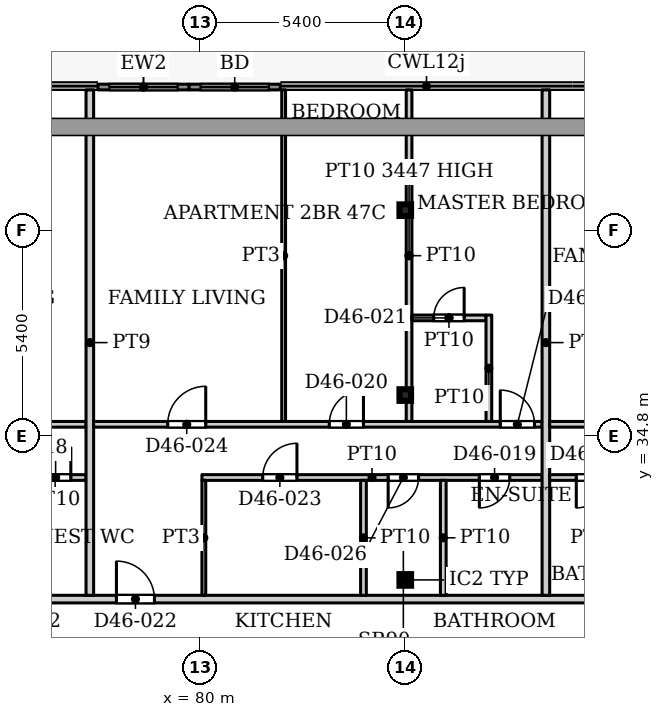
"""IFC4 building model, lengths in metres.
Left out: names, types, materials, properties, quantities, classifications, styles, units other than length and angle.
Written with IfcOpenShell. Run it as: python <this file> out.ifc"""

import sys

from ifc_helpers import new_model, si_unit, direction, frame, frame_2d, origin, origin_2d, place, context, subcontext, project, spatial, rectangle, hollow_rectangle, extrude, source, transform, mapped, element, fill, save


model = new_model("IFC4")
c1 = context("Model", 3, precision=1e-05, world=origin(), true_north=direction((0.0, 1.0)))
c2 = subcontext(c1, "Body", "Model", "MODEL_VIEW")
j1 = project(units=[si_unit("LENGTHUNIT", "METRE"), si_unit("PLANEANGLEUNIT", "RADIAN")], contexts=[c1])
p1 = place(None, origin())
s1 = spatial("IfcSite", under=j1, at=p1, CompositionType="ELEMENT")
p2 = place(p1, origin())
s2 = spatial("IfcBuilding", under=s1, at=p2, CompositionType="ELEMENT")
p3 = place(p2, frame((0.0, 0.0, 199.4)))
s3 = spatial("IfcBuildingStorey", under=s2, at=p3, CompositionType="ELEMENT", Elevation=199.4)
for number, where, z_axis, x_axis in (
    (1, (85.4, 31.005, 0.0), (0.0, 0.0, 1.0), (1.0, 0.0, 0.0)),
    (2, (85.4, 35.87, 0.0), (0.0, 0.0, 1.0), (1.0, 0.0, 0.0)),
    (3, (85.4, 40.735, 0.0), (0.0, 0.0, 1.0), (1.0, 0.0, 0.0)),
):
    element("IfcColumn", number, at=place(p3, frame(where, z_axis=z_axis, x_axis=x_axis)), inside=s3, PredefinedType="COLUMN", context=c2, shape_type="SweptSolid", body=[
        extrude(hollow_rectangle(XDim=0.305, YDim=0.305, WallThickness=0.016, InnerFilletRadius=0.016, OuterFilletRadius=0.032, at=origin_2d()), origin(), (0.0, 0.0, 1.0), 3.9),
    ])
p4 = place(p3, frame((77.312, 43.975, 0.0), z_axis=(0.0, 0.0, 1.0), x_axis=(1.0, 0.0, 0.0)))
e4 = element("IfcWall", 4, at=p4, inside=s3, PredefinedType="SOLIDWALL", context=c2, shape_type="SweptSolid", body=[
    extrude(rectangle(XDim=2.4, YDim=0.15, at=frame_2d((1.2, 0.0))), origin(), (0.0, 0.0, 1.0), 3.75),
])
p5 = place(p4, frame((0.3, 0.0, 0.0)))
e5 = element("IfcOpeningElement", 5, at=p5, cuts=e4, PredefinedType="OPENING", context=c2, shape_type="SweptSolid", body=[
    extrude(rectangle(XDim=1.8, YDim=2.4, at=frame_2d((0.9, 1.2))), frame((0.0, 0.085, 0.0), z_axis=(0.0, -1.0, 0.0), x_axis=(1.0, 0.0, 0.0)), (0.0, 0.0, 1.0), 0.17),
])
p6 = place(p3, frame((79.712, 43.975, 0.0), z_axis=(0.0, 0.0, 1.0), x_axis=(1.0, 0.0, 0.0)))
e6 = element("IfcWall", 6, at=p6, inside=s3, PredefinedType="SOLIDWALL", context=c2, shape_type="SweptSolid", body=[
    extrude(rectangle(XDim=2.4, YDim=0.15, at=frame_2d((1.2, 0.0))), origin(), (0.0, 0.0, 1.0), 3.75),
])
p7 = place(p6, frame((0.3, 0.0, 0.0)))
e7 = element("IfcOpeningElement", 7, at=p7, cuts=e6, PredefinedType="OPENING", context=c2, shape_type="SweptSolid", body=[
    extrude(rectangle(XDim=1.8, YDim=2.4, at=frame_2d((0.9, 1.2))), frame((0.0, 0.085, 0.0), z_axis=(0.0, -1.0, 0.0), x_axis=(1.0, 0.0, 0.0)), (0.0, 0.0, 1.0), 0.17),
])
p8 = place(p3, frame((53.549, 30.5, 0.0), z_axis=(0.0, 0.0, 1.0), x_axis=(1.0, 0.0, 0.0)))
e8 = element("IfcWall", 8, at=p8, inside=s3, PredefinedType="PARTITIONING", context=c2, shape_type="SweptSolid", body=[
    extrude(rectangle(XDim=44.551, YDim=0.2, at=frame_2d((22.275, 0.0))), origin(), (0.0, 0.0, 1.0), 3.6),
])
p9 = place(p8, frame((5.501, 0.0, 0.0)))
e9 = element("IfcOpeningElement", 9, at=p9, cuts=e8, PredefinedType="OPENING", context=c2, shape_type="SweptSolid", body=[
    extrude(rectangle(XDim=1.0, YDim=2.1, at=frame_2d((0.5, 1.05))), frame((0.0, 0.11, 0.0), z_axis=(0.0, -1.0, 0.0), x_axis=(1.0, 0.0, 0.0)), (0.0, 0.0, 1.0), 0.22),
])
p10 = place(p8, frame((20.201, 0.0, 0.0)))
e10 = element("IfcOpeningElement", 10, at=p10, cuts=e8, PredefinedType="OPENING", context=c2, shape_type="SweptSolid", body=[
    extrude(rectangle(XDim=1.0, YDim=2.1, at=frame_2d((0.5, 1.05))), frame((0.0, 0.11, 0.0), z_axis=(0.0, -1.0, 0.0), x_axis=(1.0, 0.0, 0.0)), (0.0, 0.0, 1.0), 0.22),
])
p11 = place(p8, frame((24.251, 0.0, 0.0)))
e11 = element("IfcOpeningElement", 11, at=p11, cuts=e8, PredefinedType="OPENING", context=c2, shape_type="SweptSolid", body=[
    extrude(rectangle(XDim=1.0, YDim=2.1, at=frame_2d((0.5, 1.05))), frame((0.0, 0.11, 0.0), z_axis=(0.0, -1.0, 0.0), x_axis=(1.0, 0.0, 0.0)), (0.0, 0.0, 1.0), 0.22),
])
p12 = place(p8, frame((40.151, 0.0, 0.0)))
e12 = element("IfcOpeningElement", 12, at=p12, cuts=e8, PredefinedType="OPENING", context=c2, shape_type="SweptSolid", body=[
    extrude(rectangle(XDim=1.0, YDim=2.1, at=frame_2d((0.5, 1.05))), frame((0.0, 0.11, 0.0), z_axis=(0.0, -1.0, 0.0), x_axis=(1.0, 0.0, 0.0)), (0.0, 0.0, 1.0), 0.22),
])
p13 = place(p3, frame((67.3, 35.1, 0.0), z_axis=(0.0, 0.0, 1.0), x_axis=(1.0, 0.0, 0.0)))
e13 = element("IfcWall", 13, at=p13, inside=s3, PredefinedType="PARTITIONING", context=c2, shape_type="SweptSolid", body=[
    extrude(rectangle(XDim=9.7, YDim=0.15, at=frame_2d((4.85, 0.0))), origin(), (0.0, 0.0, 1.0), 3.6),
])
p14 = place(p13, frame((1.0, 0.0, 0.0)))
e14 = element("IfcOpeningElement", 14, at=p14, cuts=e13, PredefinedType="OPENING", context=c2, shape_type="SweptSolid", body=[
    extrude(rectangle(XDim=0.9, YDim=2.1, at=frame_2d((0.45, 1.05))), frame((0.0, 0.085, 0.0), z_axis=(0.0, -1.0, 0.0), x_axis=(1.0, 0.0, 0.0)), (0.0, 0.0, 1.0), 0.17),
])
p15 = place(p13, frame((6.3, 0.0, 0.0)))
e15 = element("IfcOpeningElement", 15, at=p15, cuts=e13, PredefinedType="OPENING", context=c2, shape_type="SweptSolid", body=[
    extrude(rectangle(XDim=1.0, YDim=2.1, at=frame_2d((0.5, 1.05))), frame((0.0, 0.085, 0.0), z_axis=(0.0, -1.0, 0.0), x_axis=(1.0, 0.0, 0.0)), (0.0, 0.0, 1.0), 0.17),
])
p16 = place(p3, frame((75.375, 33.7, 0.0), z_axis=(0.0, 0.0, 1.0), x_axis=(1.0, 0.0, 0.0)))
e16 = element("IfcWall", 16, at=p16, inside=s3, PredefinedType="PARTITIONING", context=c2, shape_type="SweptSolid", body=[
    extrude(rectangle(XDim=1.625, YDim=0.15, at=frame_2d((0.812, 0.0))), origin(), (0.0, 0.0, 1.0), 3.6),
])
p17 = place(p16, frame((0.425, 0.0, 0.0)))
e17 = element("IfcOpeningElement", 17, at=p17, cuts=e16, PredefinedType="OPENING", context=c2, shape_type="SweptSolid", body=[
    extrude(rectangle(XDim=0.8, YDim=2.1, at=frame_2d((0.4, 1.05))), frame((0.0, 0.085, 0.0), z_axis=(0.0, -1.0, 0.0), x_axis=(1.0, 0.0, 0.0)), (0.0, 0.0, 1.0), 0.17),
])
p18 = place(p3, frame((77.1, 30.6, 0.0), z_axis=(0.0, 0.0, 1.0), x_axis=(0.0, 1.0, 0.0)))
e18 = element("IfcWall", 18, at=p18, inside=s3, PredefinedType="PARTITIONING", context=c2, shape_type="SweptSolid", body=[
    extrude(rectangle(XDim=13.3, YDim=0.2, at=frame_2d((6.65, 0.0))), origin(), (0.0, 0.0, 1.0), 3.6),
])
p19 = place(p3, frame((77.2, 35.1, 0.0), z_axis=(0.0, 0.0, 1.0), x_axis=(1.0, 0.0, 0.0)))
e19 = element("IfcWall", 19, at=p19, inside=s3, PredefinedType="PARTITIONING", context=c2, shape_type="SweptSolid", body=[
    extrude(rectangle(XDim=11.8, YDim=0.15, at=frame_2d((5.9, 0.0))), origin(), (0.0, 0.0, 1.0), 3.6),
])
p20 = place(p19, frame((6.2, 0.0, 0.0)))
e20 = element("IfcOpeningElement", 20, at=p20, cuts=e19, PredefinedType="OPENING", context=c2, shape_type="SweptSolid", body=[
    extrude(rectangle(XDim=0.9, YDim=2.1, at=frame_2d((0.45, 1.05))), frame((0.0, 0.085, 0.0), z_axis=(0.0, -1.0, 0.0), x_axis=(1.0, 0.0, 0.0)), (0.0, 0.0, 1.0), 0.17),
])
p21 = place(p19, frame((1.95, 0.0, 0.0)))
e21 = element("IfcOpeningElement", 21, at=p21, cuts=e19, PredefinedType="OPENING", context=c2, shape_type="SweptSolid", body=[
    extrude(rectangle(XDim=1.0, YDim=2.1, at=frame_2d((0.5, 1.05))), frame((0.0, 0.085, 0.0), z_axis=(0.0, -1.0, 0.0), x_axis=(1.0, 0.0, 0.0)), (0.0, 0.0, 1.0), 0.17),
])
p22 = place(p19, frame((10.7, 0.0, 0.0)))
e22 = element("IfcOpeningElement", 22, at=p22, cuts=e19, PredefinedType="OPENING", context=c2, shape_type="SweptSolid", body=[
    extrude(rectangle(XDim=0.9, YDim=2.1, at=frame_2d((0.45, 1.05))), frame((0.0, 0.085, 0.0), z_axis=(0.0, -1.0, 0.0), x_axis=(1.0, 0.0, 0.0)), (0.0, 0.0, 1.0), 0.17),
])
p23 = place(p3, frame((80.05, 33.7, 0.0), z_axis=(0.0, 0.0, 1.0), x_axis=(1.0, 0.0, 0.0)))
e23 = element("IfcWall", 23, at=p23, inside=s3, PredefinedType="PARTITIONING", context=c2, shape_type="SweptSolid", body=[
    extrude(rectangle(XDim=8.95, YDim=0.15, at=frame_2d((4.475, 0.0))), origin(), (0.0, 0.0, 1.0), 3.6),
])
p24 = place(p23, frame((7.3, 0.0, 0.0)))
e24 = element("IfcOpeningElement", 24, at=p24, cuts=e23, PredefinedType="OPENING", context=c2, shape_type="SweptSolid", body=[
    extrude(rectangle(XDim=0.8, YDim=2.1, at=frame_2d((0.4, 1.05))), frame((0.0, 0.085, 0.0), z_axis=(0.0, -1.0, 0.0), x_axis=(1.0, 0.0, 0.0)), (0.0, 0.0, 1.0), 0.17),
])
p25 = place(p23, frame((1.6, 0.0, 0.0)))
e25 = element("IfcOpeningElement", 25, at=p25, cuts=e23, PredefinedType="OPENING", context=c2, shape_type="SweptSolid", body=[
    extrude(rectangle(XDim=0.9, YDim=2.1, at=frame_2d((0.45, 1.05))), frame((0.0, 0.085, 0.0), z_axis=(0.0, -1.0, 0.0), x_axis=(1.0, 0.0, 0.0)), (0.0, 0.0, 1.0), 0.17),
])
p26 = place(p23, frame((4.9, 0.0, 0.0)))
e26 = element("IfcOpeningElement", 26, at=p26, cuts=e23, PredefinedType="OPENING", context=c2, shape_type="SweptSolid", body=[
    extrude(rectangle(XDim=0.8, YDim=2.1, at=frame_2d((0.4, 1.05))), frame((0.0, 0.085, 0.0), z_axis=(0.0, -1.0, 0.0), x_axis=(1.0, 0.0, 0.0)), (0.0, 0.0, 1.0), 0.17),
])
p27 = place(p3, frame((80.1, 30.6, 0.0), z_axis=(0.0, 0.0, 1.0), x_axis=(0.0, 1.0, 0.0)))
e27 = element("IfcWall", 27, at=p27, inside=s3, PredefinedType="PARTITIONING", context=c2, shape_type="SweptSolid", body=[
    extrude(rectangle(XDim=3.025, YDim=0.1, at=frame_2d((1.512, 0.0))), origin(), (0.0, 0.0, 1.0), 3.6),
])
p28 = place(p3, frame((82.2, 35.175, 0.0), z_axis=(0.0, 0.0, 1.0), x_axis=(0.0, 1.0, 0.0)))
e28 = element("IfcWall", 28, at=p28, inside=s3, PredefinedType="PARTITIONING", context=c2, shape_type="SweptSolid", body=[
    extrude(rectangle(XDim=8.725, YDim=0.1, at=frame_2d((4.362, 0.0))), origin(), (0.0, 0.0, 1.0), 3.6),
])
p29 = place(p3, frame((84.3, 30.6, 0.0), z_axis=(0.0, 0.0, 1.0), x_axis=(0.0, 1.0, 0.0)))
e29 = element("IfcWall", 29, at=p29, inside=s3, PredefinedType="PARTITIONING", context=c2, shape_type="SweptSolid", body=[
    extrude(rectangle(XDim=3.025, YDim=0.15, at=frame_2d((1.512, 0.0))), origin(), (0.0, 0.0, 1.0), 3.6),
])
p30 = place(p3, frame((85.5, 35.175, 0.0), z_axis=(0.0, 0.0, 1.0), x_axis=(0.0, 1.0, 0.0)))
e30 = element("IfcWall", 30, at=p30, inside=s3, PredefinedType="PARTITIONING", context=c2, shape_type="SweptSolid", body=[
    extrude(rectangle(XDim=8.725, YDim=0.15, at=frame_2d((4.362, 0.0))), origin(), (0.0, 0.0, 1.0), 3.447),
])
p31 = place(p3, frame((85.575, 37.9, 0.0), z_axis=(0.0, 0.0, 1.0), x_axis=(1.0, 0.0, 0.0)))
e31 = element("IfcWall", 31, at=p31, inside=s3, PredefinedType="PARTITIONING", context=c2, shape_type="SweptSolid", body=[
    extrude(rectangle(XDim=1.95, YDim=0.15, at=frame_2d((0.975, 0.0))), origin(), (0.0, 0.0, 1.0), 3.6),
])
p32 = place(p31, frame((0.575, 0.0, 0.0)))
e32 = element("IfcOpeningElement", 32, at=p32, cuts=e31, PredefinedType="OPENING", context=c2, shape_type="SweptSolid", body=[
    extrude(rectangle(XDim=0.8, YDim=2.1, at=frame_2d((0.4, 1.05))), frame((0.0, 0.085, 0.0), z_axis=(0.0, -1.0, 0.0), x_axis=(1.0, 0.0, 0.0)), (0.0, 0.0, 1.0), 0.17),
])
p33 = place(p3, frame((86.4, 30.6, 0.0), z_axis=(0.0, 0.0, 1.0), x_axis=(0.0, 1.0, 0.0)))
e33 = element("IfcWall", 33, at=p33, inside=s3, PredefinedType="PARTITIONING", context=c2, shape_type="SweptSolid", body=[
    extrude(rectangle(XDim=3.025, YDim=0.15, at=frame_2d((1.512, 0.0))), origin(), (0.0, 0.0, 1.0), 3.6),
])
p34 = place(p3, frame((87.6, 35.175, 0.0), z_axis=(0.0, 0.0, 1.0), x_axis=(0.0, 1.0, 0.0)))
e34 = element("IfcWall", 34, at=p34, inside=s3, PredefinedType="PARTITIONING", context=c2, shape_type="SweptSolid", body=[
    extrude(rectangle(XDim=2.8, YDim=0.15, at=frame_2d((1.4, 0.0))), origin(), (0.0, 0.0, 1.0), 3.6),
])
p35 = place(p3, frame((89.1, 30.6, 0.0), z_axis=(0.0, 0.0, 1.0), x_axis=(0.0, 1.0, 0.0)))
e35 = element("IfcWall", 35, at=p35, inside=s3, PredefinedType="PARTITIONING", context=c2, shape_type="SweptSolid", body=[
    extrude(rectangle(XDim=13.3, YDim=0.2, at=frame_2d((6.65, 0.0))), origin(), (0.0, 0.0, 1.0), 3.6),
])
p36 = place(p3, frame((89.2, 33.7, 0.0), z_axis=(0.0, 0.0, 1.0), x_axis=(1.0, 0.0, 0.0)))
e36 = element("IfcWall", 36, at=p36, inside=s3, PredefinedType="PARTITIONING", context=c2, shape_type="SweptSolid", body=[
    extrude(rectangle(XDim=4.15, YDim=0.15, at=frame_2d((2.075, 0.0))), origin(), (0.0, 0.0, 1.0), 3.6),
])
p37 = place(p36, frame((0.7, 0.0, 0.0)))
e37 = element("IfcOpeningElement", 37, at=p37, cuts=e36, PredefinedType="OPENING", context=c2, shape_type="SweptSolid", body=[
    extrude(rectangle(XDim=0.8, YDim=2.1, at=frame_2d((0.4, 1.05))), frame((0.0, 0.085, 0.0), z_axis=(0.0, -1.0, 0.0), x_axis=(1.0, 0.0, 0.0)), (0.0, 0.0, 1.0), 0.17),
])
p38 = place(p36, frame((2.8, 0.0, 0.0)))
e38 = element("IfcOpeningElement", 38, at=p38, cuts=e36, PredefinedType="OPENING", context=c2, shape_type="SweptSolid", body=[
    extrude(rectangle(XDim=0.8, YDim=2.1, at=frame_2d((0.4, 1.05))), frame((0.0, 0.085, 0.0), z_axis=(0.0, -1.0, 0.0), x_axis=(1.0, 0.0, 0.0)), (0.0, 0.0, 1.0), 0.17),
])
p39 = place(p3, frame((89.2, 35.1, 0.0), z_axis=(0.0, 0.0, 1.0), x_axis=(1.0, 0.0, 0.0)))
e39 = element("IfcWall", 39, at=p39, inside=s3, PredefinedType="PARTITIONING", context=c2, shape_type="SweptSolid", body=[
    extrude(rectangle(XDim=10.7, YDim=0.15, at=frame_2d((5.35, 0.0))), origin(), (0.0, 0.0, 1.0), 3.6),
])
p40 = place(p39, frame((9.05, 0.0, 0.0)))
e40 = element("IfcOpeningElement", 40, at=p40, cuts=e39, PredefinedType="OPENING", context=c2, shape_type="SweptSolid", body=[
    extrude(rectangle(XDim=0.9, YDim=2.1, at=frame_2d((0.45, 1.05))), frame((0.0, 0.085, 0.0), z_axis=(0.0, -1.0, 0.0), x_axis=(1.0, 0.0, 0.0)), (0.0, 0.0, 1.0), 0.17),
])
p41 = place(p39, frame((1.65, 0.0, 0.0)))
e41 = element("IfcOpeningElement", 41, at=p41, cuts=e39, PredefinedType="OPENING", context=c2, shape_type="SweptSolid", body=[
    extrude(rectangle(XDim=1.0, YDim=2.1, at=frame_2d((0.5, 1.05))), frame((0.0, 0.085, 0.0), z_axis=(0.0, -1.0, 0.0), x_axis=(1.0, 0.0, 0.0)), (0.0, 0.0, 1.0), 0.17),
])
p42 = place(p39, frame((6.95, 0.0, 0.0)))
e42 = element("IfcOpeningElement", 42, at=p42, cuts=e39, PredefinedType="OPENING", context=c2, shape_type="SweptSolid", body=[
    extrude(rectangle(XDim=0.9, YDim=2.1, at=frame_2d((0.45, 1.05))), frame((0.0, 0.085, 0.0), z_axis=(0.0, -1.0, 0.0), x_axis=(1.0, 0.0, 0.0)), (0.0, 0.0, 1.0), 0.17),
])
m1 = source(origin(), c2, "Body", "SweptSolid", [
    extrude(rectangle(XDim=1.8, YDim=2.4, at=frame_2d((0.9, 1.2))), frame((0.0, 0.025, 0.0), z_axis=(0.0, -1.0, 0.0), x_axis=(1.0, 0.0, 0.0)), (0.0, 0.0, 1.0), 0.05),
])
p43 = place(p5, origin())
e43 = element("IfcDoor", 43, at=p43, inside=s3, OperationType="SLIDING_TO_LEFT", PredefinedType="DOOR", context=c2, shape_type="MappedRepresentation", body=[
    mapped(m1, transform((0.0, 0.0, 0.0), x_axis=(1.0, 0.0, 0.0), y_axis=(0.0, 1.0, 0.0), z_axis=(0.0, 0.0, 1.0), scale=1.0)),
])
fill(e5, e43)
p44 = place(p7, origin())
e44 = element("IfcDoor", 44, at=p44, inside=s3, OperationType="SLIDING_TO_LEFT", PredefinedType="DOOR", context=c2, shape_type="MappedRepresentation", body=[
    mapped(m1, transform((0.0, 0.0, 0.0), x_axis=(1.0, 0.0, 0.0), y_axis=(0.0, 1.0, 0.0), z_axis=(0.0, 0.0, 1.0), scale=1.0)),
])
fill(e7, e44)
m2 = source(origin(), c2, "Body", "SweptSolid", [
    extrude(rectangle(XDim=0.8, YDim=2.1, at=frame_2d((0.4, 1.05))), frame((0.0, 0.025, 0.0), z_axis=(0.0, -1.0, 0.0), x_axis=(1.0, 0.0, 0.0)), (0.0, 0.0, 1.0), 0.05),
])
p45 = place(p17, origin())
e45 = element("IfcDoor", 45, at=p45, inside=s3, OperationType="SINGLE_SWING_LEFT", PredefinedType="DOOR", context=c2, shape_type="MappedRepresentation", body=[
    mapped(m2, transform((0.0, 0.0, 0.0), x_axis=(1.0, 0.0, 0.0), y_axis=(0.0, 1.0, 0.0), z_axis=(0.0, 0.0, 1.0), scale=1.0)),
])
fill(e17, e45)
p46 = place(p24, origin())
e46 = element("IfcDoor", 46, at=p46, inside=s3, OperationType="SINGLE_SWING_RIGHT", PredefinedType="DOOR", context=c2, shape_type="MappedRepresentation", body=[
    mapped(m2, transform((0.0, 0.0, 0.0), x_axis=(1.0, 0.0, 0.0), y_axis=(0.0, 1.0, 0.0), z_axis=(0.0, 0.0, 1.0), scale=1.0)),
])
fill(e24, e46)
m3 = source(origin(), c2, "Body", "SweptSolid", [
    extrude(rectangle(XDim=0.9, YDim=2.1, at=frame_2d((0.45, 1.05))), frame((0.0, 0.025, 0.0), z_axis=(0.0, -1.0, 0.0), x_axis=(1.0, 0.0, 0.0)), (0.0, 0.0, 1.0), 0.05),
])
p47 = place(p20, origin())
e47 = element("IfcDoor", 47, at=p47, inside=s3, OperationType="SINGLE_SWING_LEFT", PredefinedType="DOOR", context=c2, shape_type="MappedRepresentation", body=[
    mapped(m3, transform((0.0, 0.0, 0.0), x_axis=(1.0, 0.0, 0.0), y_axis=(0.0, 1.0, 0.0), z_axis=(0.0, 0.0, 1.0), scale=1.0)),
])
fill(e20, e47)
p48 = place(p32, origin())
e48 = element("IfcDoor", 48, at=p48, inside=s3, OperationType="SINGLE_SWING_LEFT", PredefinedType="DOOR", context=c2, shape_type="MappedRepresentation", body=[
    mapped(m2, transform((0.0, 0.0, 0.0), x_axis=(1.0, 0.0, 0.0), y_axis=(0.0, 1.0, 0.0), z_axis=(0.0, 0.0, 1.0), scale=1.0)),
])
fill(e32, e48)
m4 = source(origin(), c2, "Body", "SweptSolid", [
    extrude(rectangle(XDim=1.0, YDim=2.1, at=frame_2d((0.5, 1.05))), frame((0.0, 0.025, 0.0), z_axis=(0.0, -1.0, 0.0), x_axis=(1.0, 0.0, 0.0)), (0.0, 0.0, 1.0), 0.05),
])
p49 = place(p11, origin())
e49 = element("IfcDoor", 49, at=p49, inside=s3, OperationType="SINGLE_SWING_LEFT", PredefinedType="DOOR", context=c2, shape_type="MappedRepresentation", body=[
    mapped(m4, transform((0.0, 0.0, 0.0), x_axis=(1.0, 0.0, 0.0), y_axis=(0.0, 1.0, 0.0), z_axis=(0.0, 0.0, 1.0), scale=1.0)),
])
fill(e11, e49)
p50 = place(p25, origin())
e50 = element("IfcDoor", 50, at=p50, inside=s3, OperationType="SINGLE_SWING_LEFT", PredefinedType="DOOR", context=c2, shape_type="MappedRepresentation", body=[
    mapped(m3, transform((0.0, 0.0, 0.0), x_axis=(1.0, 0.0, 0.0), y_axis=(0.0, 1.0, 0.0), z_axis=(0.0, 0.0, 1.0), scale=1.0)),
])
fill(e25, e50)
m5 = source(origin(), c2, "Body", "SweptSolid", [
    extrude(rectangle(XDim=1.0, YDim=2.1, at=frame_2d((0.5, 1.05))), frame((0.0, 0.025, 0.0), z_axis=(0.0, -1.0, 0.0), x_axis=(1.0, 0.0, 0.0)), (0.0, 0.0, 1.0), 0.05),
])
p51 = place(p21, origin())
e51 = element("IfcDoor", 51, at=p51, inside=s3, OperationType="SINGLE_SWING_LEFT", PredefinedType="DOOR", context=c2, shape_type="MappedRepresentation", body=[
    mapped(m5, transform((0.0, 0.0, 0.0), x_axis=(1.0, 0.0, 0.0), y_axis=(0.0, 1.0, 0.0), z_axis=(0.0, 0.0, 1.0), scale=1.0)),
])
fill(e21, e51)
p52 = place(p22, origin())
e52 = element("IfcDoor", 52, at=p52, inside=s3, OperationType="SINGLE_SWING_LEFT", PredefinedType="DOOR", context=c2, shape_type="MappedRepresentation", body=[
    mapped(m3, transform((0.0, 0.0, 0.0), x_axis=(1.0, 0.0, 0.0), y_axis=(0.0, 1.0, 0.0), z_axis=(0.0, 0.0, 1.0), scale=1.0)),
])
fill(e22, e52)
p53 = place(p26, origin())
e53 = element("IfcDoor", 53, at=p53, inside=s3, OperationType="SINGLE_SWING_RIGHT", PredefinedType="DOOR", context=c2, shape_type="MappedRepresentation", body=[
    mapped(m2, transform((0.0, 0.0, 0.0), x_axis=(1.0, 0.0, 0.0), y_axis=(0.0, 1.0, 0.0), z_axis=(0.0, 0.0, 1.0), scale=1.0)),
])
fill(e26, e53)
p54 = place(p37, origin())
e54 = element("IfcDoor", 54, at=p54, inside=s3, OperationType="SINGLE_SWING_RIGHT", PredefinedType="DOOR", context=c2, shape_type="MappedRepresentation", body=[
    mapped(m2, transform((0.0, 0.0, 0.0), x_axis=(1.0, 0.0, 0.0), y_axis=(0.0, 1.0, 0.0), z_axis=(0.0, 0.0, 1.0), scale=1.0)),
])
fill(e37, e54)
save(model, sys.argv[1])
